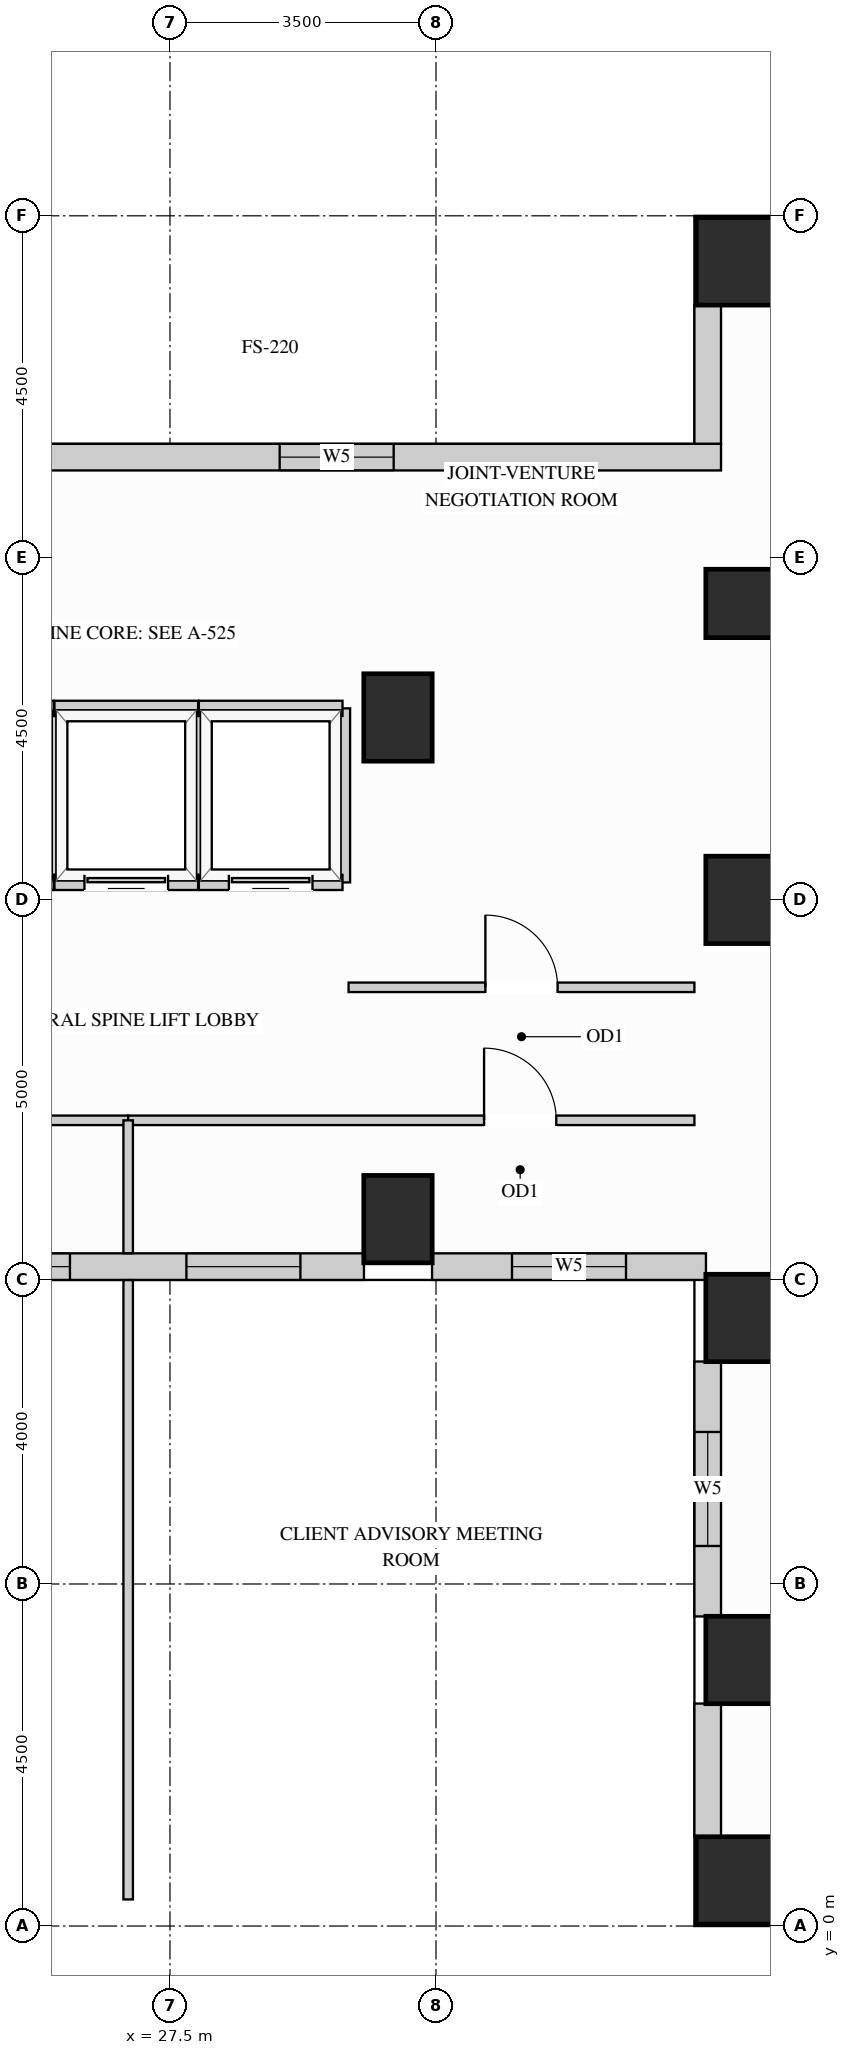
"""IFC4 building model, lengths in metres.
Left out: names, types, materials, properties, quantities, classifications, styles, units other than length and angle.
Written with IfcOpenShell. Run it as: python <this file> out.ifc"""

import sys

from ifc_helpers import new_model, si_unit, direction, frame, frame_2d, origin, origin_2d, place, context, subcontext, project, spatial, rectangle, extrude, source, transform, mapped, element, fill, save


model = new_model("IFC4")
c1 = context("Model", 3, precision=1e-05, world=origin(), true_north=direction((0.0, 1.0)))
c2 = subcontext(c1, "Body", "Model", "MODEL_VIEW")
j1 = project(units=[si_unit("LENGTHUNIT", "METRE"), si_unit("PLANEANGLEUNIT", "RADIAN")], contexts=[c1])
p1 = place(None, origin())
s1 = spatial("IfcSite", under=j1, at=p1, CompositionType="ELEMENT")
p2 = place(p1, origin())
s2 = spatial("IfcBuilding", under=s1, at=p2, CompositionType="ELEMENT")
p3 = place(p2, frame((0.0, 0.0, 124.2)))
s3 = spatial("IfcBuildingStorey", under=s2, at=p3, CompositionType="ELEMENT", Elevation=124.2)
m1 = source(origin(), c2, "Body", "SweptSolid", [
    extrude(rectangle(XDim=0.9, YDim=0.9, at=origin_2d()), origin(), (0.0, 0.0, 1.0), 3.38),
])
p4 = place(p3, frame((35.0, 17.4, 0.0), z_axis=(0.0, 0.0, 1.0), x_axis=(1.0, 0.0, 0.0)))
e1 = element("IfcColumn", 1, at=p4, inside=s3, PredefinedType="COLUMN", context=c2, shape_type="MappedRepresentation", body=[
    mapped(m1, transform((0.0, 0.0, 0.0), x_axis=(1.0, 0.0, 0.0), y_axis=(0.0, 1.0, 0.0), z_axis=(0.0, 0.0, 1.0))),
])
m2 = source(origin(), c2, "Body", "SweptSolid", [
    extrude(rectangle(XDim=0.9, YDim=1.15, at=origin_2d()), origin(), (0.0, 0.0, 1.0), 3.38),
])
for number, where, z_axis, x_axis in (
    (2, (35.0, 13.5, 0.0), (0.0, 0.0, 1.0), (1.0, 0.0, 0.0)),
    (3, (35.0, 3.5, 0.0), (0.0, 0.0, 1.0), (1.0, 0.0, 0.0)),
    (4, (35.0, 8.0, 0.0), (0.0, 0.0, 1.0), (1.0, 0.0, 0.0)),
    (5, (30.5, 15.9, 0.0), (0.0, 0.0, 1.0), (1.0, 0.0, 0.0)),
    (6, (30.5, 9.3, 0.0), (0.0, 0.0, 1.0), (1.0, 0.0, 0.0)),
):
    element("IfcColumn", number, at=place(p3, frame(where, z_axis=z_axis, x_axis=x_axis)), inside=s3, PredefinedType="COLUMN", context=c2, shape_type="MappedRepresentation", body=[
        mapped(m2, transform((0.0, 0.0, 0.0), x_axis=(1.0, 0.0, 0.0), y_axis=(0.0, 1.0, 0.0), z_axis=(0.0, 0.0, 1.0))),
    ])
m3 = source(origin(), c2, "Body", "SweptSolid", [
    extrude(rectangle(XDim=1.15, YDim=1.15, at=origin_2d()), origin(), (0.0, 0.0, 1.0), 3.38),
])
for number, where, z_axis, x_axis in (
    (7, (35.0, 21.9, 0.0), (0.0, 0.0, 1.0), (1.0, 0.0, 0.0)),
    (8, (35.0, 0.6, 0.0), (0.0, 0.0, 1.0), (1.0, 0.0, 0.0)),
):
    element("IfcColumn", number, at=place(p3, frame(where, z_axis=z_axis, x_axis=x_axis)), inside=s3, PredefinedType="COLUMN", context=c2, shape_type="MappedRepresentation", body=[
        mapped(m3, transform((0.0, 0.0, 0.0), x_axis=(1.0, 0.0, 0.0), y_axis=(0.0, 1.0, 0.0), z_axis=(0.0, 0.0, 1.0))),
    ])
p5 = place(p3, frame((23.848, 8.675, 0.0), z_axis=(0.0, 0.0, 1.0), x_axis=(1.0, 0.0, 0.0)))
e9 = element("IfcWall", 9, at=p5, inside=s3, PredefinedType="SOLIDWALL", context=c2, shape_type="SweptSolid", body=[
    extrude(rectangle(XDim=6.204, YDim=0.35, at=frame_2d((3.102, 0.0))), origin(), (0.0, 0.0, 1.0), 3.365),
])
p6 = place(p5, frame((0.836, 0.0, 0.78)))
e10 = element("IfcOpeningElement", 10, at=p6, cuts=e9, PredefinedType="OPENING", context=c2, shape_type="SweptSolid", body=[
    extrude(rectangle(XDim=1.5, YDim=2.0, at=frame_2d((0.75, 1.0))), frame((0.0, 0.185, 0.0), z_axis=(0.0, -1.0, 0.0), x_axis=(1.0, 0.0, 0.0)), (0.0, 0.0, 1.0), 0.37),
])
p7 = place(p5, frame((3.868, 0.0, 0.78)))
e11 = element("IfcOpeningElement", 11, at=p7, cuts=e9, PredefinedType="OPENING", context=c2, shape_type="SweptSolid", body=[
    extrude(rectangle(XDim=1.5, YDim=2.0, at=frame_2d((0.75, 1.0))), frame((0.0, 0.185, 0.0), z_axis=(0.0, -1.0, 0.0), x_axis=(1.0, 0.0, 0.0)), (0.0, 0.0, 1.0), 0.37),
])
p8 = place(p3, frame((30.948, 8.675, 0.0), z_axis=(0.0, 0.0, 1.0), x_axis=(1.0, 0.0, 0.0)))
e12 = element("IfcWall", 12, at=p8, inside=s3, PredefinedType="SOLIDWALL", context=c2, shape_type="SweptSolid", body=[
    extrude(rectangle(XDim=3.604, YDim=0.35, at=frame_2d((1.802, 0.0))), origin(), (0.0, 0.0, 1.0), 3.365),
])
p9 = place(p8, frame((1.052, 0.0, 0.78)))
e13 = element("IfcOpeningElement", 13, at=p9, cuts=e12, PredefinedType="OPENING", context=c2, shape_type="SweptSolid", body=[
    extrude(rectangle(XDim=1.5, YDim=2.0, at=frame_2d((0.75, 1.0))), frame((0.0, 0.185, 0.0), z_axis=(0.0, -1.0, 0.0), x_axis=(1.0, 0.0, 0.0)), (0.0, 0.0, 1.0), 0.37),
])
p10 = place(p3, frame((34.575, 7.427, 0.0), z_axis=(0.0, 0.0, 1.0), x_axis=(0.0, -1.0, 0.0)))
e14 = element("IfcWall", 14, at=p10, inside=s3, PredefinedType="SOLIDWALL", context=c2, shape_type="SweptSolid", body=[
    extrude(rectangle(XDim=3.354, YDim=0.35, at=frame_2d((1.677, 0.0))), origin(), (0.0, 0.0, 1.0), 3.365),
])
p11 = place(p10, frame((0.927, 0.0, 0.78)))
e15 = element("IfcOpeningElement", 15, at=p11, cuts=e14, PredefinedType="OPENING", context=c2, shape_type="SweptSolid", body=[
    extrude(rectangle(XDim=1.5, YDim=2.0, at=frame_2d((0.75, 1.0))), frame((0.0, 0.185, 0.0), z_axis=(0.0, -1.0, 0.0), x_axis=(1.0, 0.0, 0.0)), (0.0, 0.0, 1.0), 0.37),
])
m4 = source(origin(), c2, "Body", "SweptSolid", [
    extrude(rectangle(XDim=1.754, YDim=0.35, at=frame_2d((0.877, 0.0))), origin(), (0.0, 0.0, 1.0), 3.365),
])
p12 = place(p3, frame((34.575, 2.927, 0.0), z_axis=(0.0, 0.0, 1.0), x_axis=(0.0, -1.0, 0.0)))
e16 = element("IfcWall", 16, at=p12, inside=s3, PredefinedType="SOLIDWALL", context=c2, shape_type="MappedRepresentation", body=[
    mapped(m4, transform((0.0, 0.0, 0.0), x_axis=(1.0, 0.0, 0.0), y_axis=(0.0, 1.0, 0.0), z_axis=(0.0, 0.0, 1.0))),
])
m5 = source(origin(), c2, "Body", "SweptSolid", [
    extrude(rectangle(XDim=1.829, YDim=0.35, at=frame_2d((0.915, 0.0))), origin(), (0.0, 0.0, 1.0), 3.365),
])
p13 = place(p3, frame((34.575, 21.327, 0.0), z_axis=(0.0, 0.0, 1.0), x_axis=(0.0, -1.0, 0.0)))
e17 = element("IfcWall", 17, at=p13, inside=s3, PredefinedType="SOLIDWALL", context=c2, shape_type="MappedRepresentation", body=[
    mapped(m5, transform((0.0, 0.0, 0.0), x_axis=(1.0, 0.0, 0.0), y_axis=(0.0, 1.0, 0.0), z_axis=(0.0, 0.0, 1.0))),
])
p14 = place(p3, frame((34.75, 19.325, 0.0), z_axis=(0.0, 0.0, 1.0), x_axis=(-1.0, 0.0, 0.0)))
e18 = element("IfcWall", 18, at=p14, inside=s3, PredefinedType="SOLIDWALL", context=c2, shape_type="SweptSolid", body=[
    extrude(rectangle(XDim=15.6, YDim=0.35, at=frame_2d((7.8, 0.0))), origin(), (0.0, 0.0, 1.0), 3.365),
])
p15 = place(p14, frame((4.307, 0.0, 0.78)))
e19 = element("IfcOpeningElement", 19, at=p15, cuts=e18, PredefinedType="OPENING", context=c2, shape_type="SweptSolid", body=[
    extrude(rectangle(XDim=1.5, YDim=2.0, at=frame_2d((0.75, 1.0))), frame((0.0, 0.185, 0.0), z_axis=(0.0, -1.0, 0.0), x_axis=(1.0, 0.0, 0.0)), (0.0, 0.0, 1.0), 0.37),
])
p16 = place(p14, frame((9.793, 0.0, 0.78)))
e20 = element("IfcOpeningElement", 20, at=p16, cuts=e18, PredefinedType="OPENING", context=c2, shape_type="SweptSolid", body=[
    extrude(rectangle(XDim=1.5, YDim=2.0, at=frame_2d((0.75, 1.0))), frame((0.0, 0.185, 0.0), z_axis=(0.0, -1.0, 0.0), x_axis=(1.0, 0.0, 0.0)), (0.0, 0.0, 1.0), 0.37),
])
p17 = place(p3, frame((29.85, 12.35, 0.0), z_axis=(0.0, 0.0, 1.0), x_axis=(1.0, 0.0, 0.0)))
e21 = element("IfcWall", 21, at=p17, inside=s3, PredefinedType="PARTITIONING", context=c2, shape_type="SweptSolid", body=[
    extrude(rectangle(XDim=4.55, YDim=0.125, at=frame_2d((2.275, 0.0))), origin(), (0.0, 0.0, 1.0), 3.365),
])
p18 = place(p17, frame((1.8, 0.0, 0.0)))
e22 = element("IfcOpeningElement", 22, at=p18, cuts=e21, PredefinedType="OPENING", context=c2, shape_type="SweptSolid", body=[
    extrude(rectangle(XDim=0.95, YDim=2.15, at=frame_2d((0.475, 1.075))), frame((0.0, 0.073, 0.0), z_axis=(0.0, -1.0, 0.0), x_axis=(1.0, 0.0, 0.0)), (0.0, 0.0, 1.0), 0.145),
])
p19 = place(p3, frame((19.5, 10.6, 0.0), z_axis=(0.0, 0.0, 1.0), x_axis=(1.0, 0.0, 0.0)))
e23 = element("IfcWall", 23, at=p19, inside=s3, PredefinedType="PARTITIONING", context=c2, shape_type="SweptSolid", body=[
    extrude(rectangle(XDim=7.45, YDim=0.125, at=frame_2d((3.725, 0.0))), origin(), (0.0, 0.0, 1.0), 3.365),
])
p20 = place(p19, frame((1.817, 0.0, 0.0)))
e24 = element("IfcOpeningElement", 24, at=p20, cuts=e23, PredefinedType="OPENING", context=c2, shape_type="SweptSolid", body=[
    extrude(rectangle(XDim=0.95, YDim=2.15, at=frame_2d((0.475, 1.075))), frame((0.0, 0.073, 0.0), z_axis=(0.0, -1.0, 0.0), x_axis=(1.0, 0.0, 0.0)), (0.0, 0.0, 1.0), 0.145),
])
p21 = place(p3, frame((26.95, 10.6, 0.0), z_axis=(0.0, 0.0, 1.0), x_axis=(1.0, 0.0, 0.0)))
e25 = element("IfcWall", 25, at=p21, inside=s3, PredefinedType="PARTITIONING", context=c2, shape_type="SweptSolid", body=[
    extrude(rectangle(XDim=7.45, YDim=0.125, at=frame_2d((3.725, 0.0))), origin(), (0.0, 0.0, 1.0), 3.365),
])
p22 = place(p21, frame((4.683, 0.0, 0.0)))
e26 = element("IfcOpeningElement", 26, at=p22, cuts=e25, PredefinedType="OPENING", context=c2, shape_type="SweptSolid", body=[
    extrude(rectangle(XDim=0.95, YDim=2.15, at=frame_2d((0.475, 1.075))), frame((0.0, 0.073, 0.0), z_axis=(0.0, -1.0, 0.0), x_axis=(1.0, 0.0, 0.0)), (0.0, 0.0, 1.0), 0.145),
])
m6 = source(origin(), c2, "Body", "SweptSolid", [
    extrude(rectangle(XDim=8.148, YDim=0.125, at=frame_2d((4.074, 0.0))), origin(), (0.0, 0.0, 1.0), 3.365),
])
p23 = place(p3, frame((26.95, 0.35, 0.0), z_axis=(0.0, 0.0, 1.0), x_axis=(0.0, 1.0, 0.0)))
e27 = element("IfcWall", 27, at=p23, inside=s3, PredefinedType="PARTITIONING", context=c2, shape_type="MappedRepresentation", body=[
    mapped(m6, transform((0.0, 0.0, 0.0), x_axis=(1.0, 0.0, 0.0), y_axis=(0.0, 1.0, 0.0), z_axis=(0.0, 0.0, 1.0))),
])
m7 = source(origin(), c2, "Body", "SweptSolid", [
    extrude(rectangle(XDim=1.748, YDim=0.125, at=frame_2d((0.874, 0.0))), origin(), (0.0, 0.0, 1.0), 3.365),
])
p24 = place(p3, frame((26.95, 8.852, 0.0), z_axis=(0.0, 0.0, 1.0), x_axis=(0.0, 1.0, 0.0)))
e28 = element("IfcWall", 28, at=p24, inside=s3, PredefinedType="PARTITIONING", context=c2, shape_type="MappedRepresentation", body=[
    mapped(m7, transform((0.0, 0.0, 0.0), x_axis=(1.0, 0.0, 0.0), y_axis=(0.0, 1.0, 0.0), z_axis=(0.0, 0.0, 1.0))),
])
m8 = source(origin(), c2, "Body", "SweptSolid", [
    extrude(rectangle(XDim=2.29, YDim=0.2, at=frame_2d((1.145, 0.0))), origin(), (0.0, 0.0, 1.0), 3.365),
])
p25 = place(p3, frame((25.97, 13.73, 0.0), z_axis=(0.0, 0.0, 1.0), x_axis=(0.0, 1.0, 0.0)))
e29 = element("IfcWall", 29, at=p25, inside=s3, PredefinedType="PARTITIONING", context=c2, shape_type="MappedRepresentation", body=[
    mapped(m8, transform((0.0, 0.0, 0.0), x_axis=(1.0, 0.0, 0.0), y_axis=(0.0, 1.0, 0.0), z_axis=(0.0, 0.0, 1.0))),
])
m9 = source(origin(), c2, "Body", "SweptSolid", [
    extrude(rectangle(XDim=1.89, YDim=0.2, at=frame_2d((0.945, 0.0))), origin(), (0.0, 0.0, 1.0), 2.677),
])
p26 = place(p3, frame((24.08, 16.02, 0.0), z_axis=(0.0, 0.0, 1.0), x_axis=(1.0, 0.0, 0.0)))
e30 = element("IfcWall", 30, at=p26, inside=s3, PredefinedType="PARTITIONING", context=c2, shape_type="MappedRepresentation", body=[
    mapped(m9, transform((0.0, 0.0, 0.0), x_axis=(1.0, 0.0, 0.0), y_axis=(0.0, 1.0, 0.0), z_axis=(0.0, 0.0, 1.0))),
])
p27 = place(p3, frame((24.08, 13.73, 0.0), z_axis=(0.0, 0.0, 1.0), x_axis=(1.0, 0.0, 0.0)))
e31 = element("IfcWall", 31, at=p27, inside=s3, PredefinedType="PARTITIONING", context=c2, shape_type="SweptSolid", body=[
    extrude(rectangle(XDim=1.89, YDim=0.2, at=frame_2d((0.945, 0.0))), origin(), (0.0, 0.0, 1.0), 2.446),
])
p28 = place(p27, frame((0.395, 0.0, 0.0)))
e32 = element("IfcOpeningElement", 32, at=p28, cuts=e31, PredefinedType="OPENING", context=c2, shape_type="SweptSolid", body=[
    extrude(rectangle(XDim=1.1, YDim=2.2, at=frame_2d((0.55, 1.1))), frame((0.0, 0.11, 0.0), z_axis=(0.0, -1.0, 0.0), x_axis=(1.0, 0.0, 0.0)), (0.0, 0.0, 1.0), 0.22),
])
p29 = place(p3, frame((27.87, 13.73, 0.0), z_axis=(0.0, 0.0, 1.0), x_axis=(0.0, 1.0, 0.0)))
e33 = element("IfcWall", 33, at=p29, inside=s3, PredefinedType="PARTITIONING", context=c2, shape_type="MappedRepresentation", body=[
    mapped(m8, transform((0.0, 0.0, 0.0), x_axis=(1.0, 0.0, 0.0), y_axis=(0.0, 1.0, 0.0), z_axis=(0.0, 0.0, 1.0))),
])
m10 = source(origin(), c2, "Body", "SweptSolid", [
    extrude(rectangle(XDim=1.89, YDim=0.2, at=frame_2d((0.945, 0.0))), origin(), (0.0, 0.0, 1.0), 2.677),
])
p30 = place(p3, frame((25.98, 16.02, 0.0), z_axis=(0.0, 0.0, 1.0), x_axis=(1.0, 0.0, 0.0)))
e34 = element("IfcWall", 34, at=p30, inside=s3, PredefinedType="PARTITIONING", context=c2, shape_type="MappedRepresentation", body=[
    mapped(m10, transform((0.0, 0.0, 0.0), x_axis=(1.0, 0.0, 0.0), y_axis=(0.0, 1.0, 0.0), z_axis=(0.0, 0.0, 1.0))),
])
p31 = place(p3, frame((25.98, 13.73, 0.0), z_axis=(0.0, 0.0, 1.0), x_axis=(1.0, 0.0, 0.0)))
e35 = element("IfcWall", 35, at=p31, inside=s3, PredefinedType="PARTITIONING", context=c2, shape_type="SweptSolid", body=[
    extrude(rectangle(XDim=1.89, YDim=0.2, at=frame_2d((0.945, 0.0))), origin(), (0.0, 0.0, 1.0), 2.446),
])
p32 = place(p31, frame((0.395, 0.0, 0.0)))
e36 = element("IfcOpeningElement", 36, at=p32, cuts=e35, PredefinedType="OPENING", context=c2, shape_type="SweptSolid", body=[
    extrude(rectangle(XDim=1.1, YDim=2.2, at=frame_2d((0.55, 1.1))), frame((0.0, 0.11, 0.0), z_axis=(0.0, -1.0, 0.0), x_axis=(1.0, 0.0, 0.0)), (0.0, 0.0, 1.0), 0.22),
])
p33 = place(p3, frame((29.77, 13.73, 0.0), z_axis=(0.0, 0.0, 1.0), x_axis=(0.0, 1.0, 0.0)))
e37 = element("IfcWall", 37, at=p33, inside=s3, PredefinedType="PARTITIONING", context=c2, shape_type="MappedRepresentation", body=[
    mapped(m8, transform((0.0, 0.0, 0.0), x_axis=(1.0, 0.0, 0.0), y_axis=(0.0, 1.0, 0.0), z_axis=(0.0, 0.0, 1.0))),
])
p34 = place(p3, frame((27.88, 16.02, 0.0), z_axis=(0.0, 0.0, 1.0), x_axis=(1.0, 0.0, 0.0)))
e38 = element("IfcWall", 38, at=p34, inside=s3, PredefinedType="PARTITIONING", context=c2, shape_type="MappedRepresentation", body=[
    mapped(m10, transform((0.0, 0.0, 0.0), x_axis=(1.0, 0.0, 0.0), y_axis=(0.0, 1.0, 0.0), z_axis=(0.0, 0.0, 1.0))),
])
p35 = place(p3, frame((27.88, 13.73, 0.0), z_axis=(0.0, 0.0, 1.0), x_axis=(1.0, 0.0, 0.0)))
e39 = element("IfcWall", 39, at=p35, inside=s3, PredefinedType="PARTITIONING", context=c2, shape_type="SweptSolid", body=[
    extrude(rectangle(XDim=1.89, YDim=0.2, at=frame_2d((0.945, 0.0))), origin(), (0.0, 0.0, 1.0), 2.446),
])
p36 = place(p35, frame((0.395, 0.0, 0.0)))
e40 = element("IfcOpeningElement", 40, at=p36, cuts=e39, PredefinedType="OPENING", context=c2, shape_type="SweptSolid", body=[
    extrude(rectangle(XDim=1.1, YDim=2.2, at=frame_2d((0.55, 1.1))), frame((0.0, 0.11, 0.0), z_axis=(0.0, -1.0, 0.0), x_axis=(1.0, 0.0, 0.0)), (0.0, 0.0, 1.0), 0.22),
])
m11 = source(origin(), c2, "Body", "SweptSolid", [
    extrude(rectangle(XDim=1.1, YDim=2.2, at=frame_2d((0.55, 1.1))), frame((0.0, 0.025, 0.0), z_axis=(0.0, -1.0, 0.0), x_axis=(1.0, 0.0, 0.0)), (0.0, 0.0, 1.0), 0.05),
])
p37 = place(p32, origin())
e41 = element("IfcDoor", 41, at=p37, inside=s3, OperationType="SLIDING_TO_LEFT", PredefinedType="DOOR", context=c2, shape_type="MappedRepresentation", body=[
    mapped(m11, transform((0.0, 0.0, 0.0), x_axis=(1.0, 0.0, 0.0), y_axis=(0.0, 1.0, 0.0), z_axis=(0.0, 0.0, 1.0))),
])
fill(e36, e41)
p38 = place(p36, origin())
e42 = element("IfcDoor", 42, at=p38, inside=s3, OperationType="SLIDING_TO_LEFT", PredefinedType="DOOR", context=c2, shape_type="MappedRepresentation", body=[
    mapped(m11, transform((0.0, 0.0, 0.0), x_axis=(1.0, 0.0, 0.0), y_axis=(0.0, 1.0, 0.0), z_axis=(0.0, 0.0, 1.0))),
])
fill(e40, e42)
m12 = source(origin(), c2, "Body", "SweptSolid", [
    extrude(rectangle(XDim=0.95, YDim=2.15, at=frame_2d((0.475, 1.075))), frame((0.0, 0.025, 0.0), z_axis=(0.0, -1.0, 0.0), x_axis=(1.0, 0.0, 0.0)), (0.0, 0.0, 1.0), 0.05),
])
p39 = place(p18, origin())
e43 = element("IfcDoor", 43, at=p39, inside=s3, OperationType="SINGLE_SWING_LEFT", PredefinedType="DOOR", context=c2, shape_type="MappedRepresentation", body=[
    mapped(m12, transform((0.0, 0.0, 0.0), x_axis=(1.0, 0.0, 0.0), y_axis=(0.0, 1.0, 0.0), z_axis=(0.0, 0.0, 1.0))),
])
fill(e22, e43)
p40 = place(p22, origin())
e44 = element("IfcDoor", 44, at=p40, inside=s3, OperationType="SINGLE_SWING_LEFT", PredefinedType="DOOR", context=c2, shape_type="MappedRepresentation", body=[
    mapped(m12, transform((0.0, 0.0, 0.0), x_axis=(1.0, 0.0, 0.0), y_axis=(0.0, 1.0, 0.0), z_axis=(0.0, 0.0, 1.0))),
])
fill(e26, e44)
m13 = source(origin(), c2, "Body", "SweptSolid", [
    extrude(rectangle(XDim=1.5, YDim=2.0, at=frame_2d((0.75, 1.0))), frame((0.0, 0.03, 0.0), z_axis=(0.0, -1.0, 0.0), x_axis=(1.0, 0.0, 0.0)), (0.0, 0.0, 1.0), 0.06),
])
p41 = place(p6, origin())
e45 = element("IfcWindow", 45, at=p41, inside=s3, PartitioningType="SINGLE_PANEL", PredefinedType="WINDOW", context=c2, shape_type="MappedRepresentation", body=[
    mapped(m13, transform((0.0, 0.0, 0.0), x_axis=(1.0, 0.0, 0.0), y_axis=(0.0, 1.0, 0.0), z_axis=(0.0, 0.0, 1.0))),
])
fill(e10, e45)
p42 = place(p7, origin())
e46 = element("IfcWindow", 46, at=p42, inside=s3, PartitioningType="SINGLE_PANEL", PredefinedType="WINDOW", context=c2, shape_type="MappedRepresentation", body=[
    mapped(m13, transform((0.0, 0.0, 0.0), x_axis=(1.0, 0.0, 0.0), y_axis=(0.0, 1.0, 0.0), z_axis=(0.0, 0.0, 1.0))),
])
fill(e11, e46)
p43 = place(p9, origin())
e47 = element("IfcWindow", 47, at=p43, inside=s3, PartitioningType="SINGLE_PANEL", PredefinedType="WINDOW", context=c2, shape_type="MappedRepresentation", body=[
    mapped(m13, transform((0.0, 0.0, 0.0), x_axis=(1.0, 0.0, 0.0), y_axis=(0.0, 1.0, 0.0), z_axis=(0.0, 0.0, 1.0))),
])
fill(e13, e47)
p44 = place(p11, origin())
e48 = element("IfcWindow", 48, at=p44, inside=s3, PartitioningType="SINGLE_PANEL", PredefinedType="WINDOW", context=c2, shape_type="MappedRepresentation", body=[
    mapped(m13, transform((0.0, 0.0, 0.0), x_axis=(1.0, 0.0, 0.0), y_axis=(0.0, 1.0, 0.0), z_axis=(0.0, 0.0, 1.0))),
])
fill(e15, e48)
p45 = place(p15, origin())
e49 = element("IfcWindow", 49, at=p45, inside=s3, PartitioningType="SINGLE_PANEL", PredefinedType="WINDOW", context=c2, shape_type="MappedRepresentation", body=[
    mapped(m13, transform((0.0, 0.0, 0.0), x_axis=(1.0, 0.0, 0.0), y_axis=(0.0, 1.0, 0.0), z_axis=(0.0, 0.0, 1.0))),
])
fill(e19, e49)
save(model, sys.argv[1])
